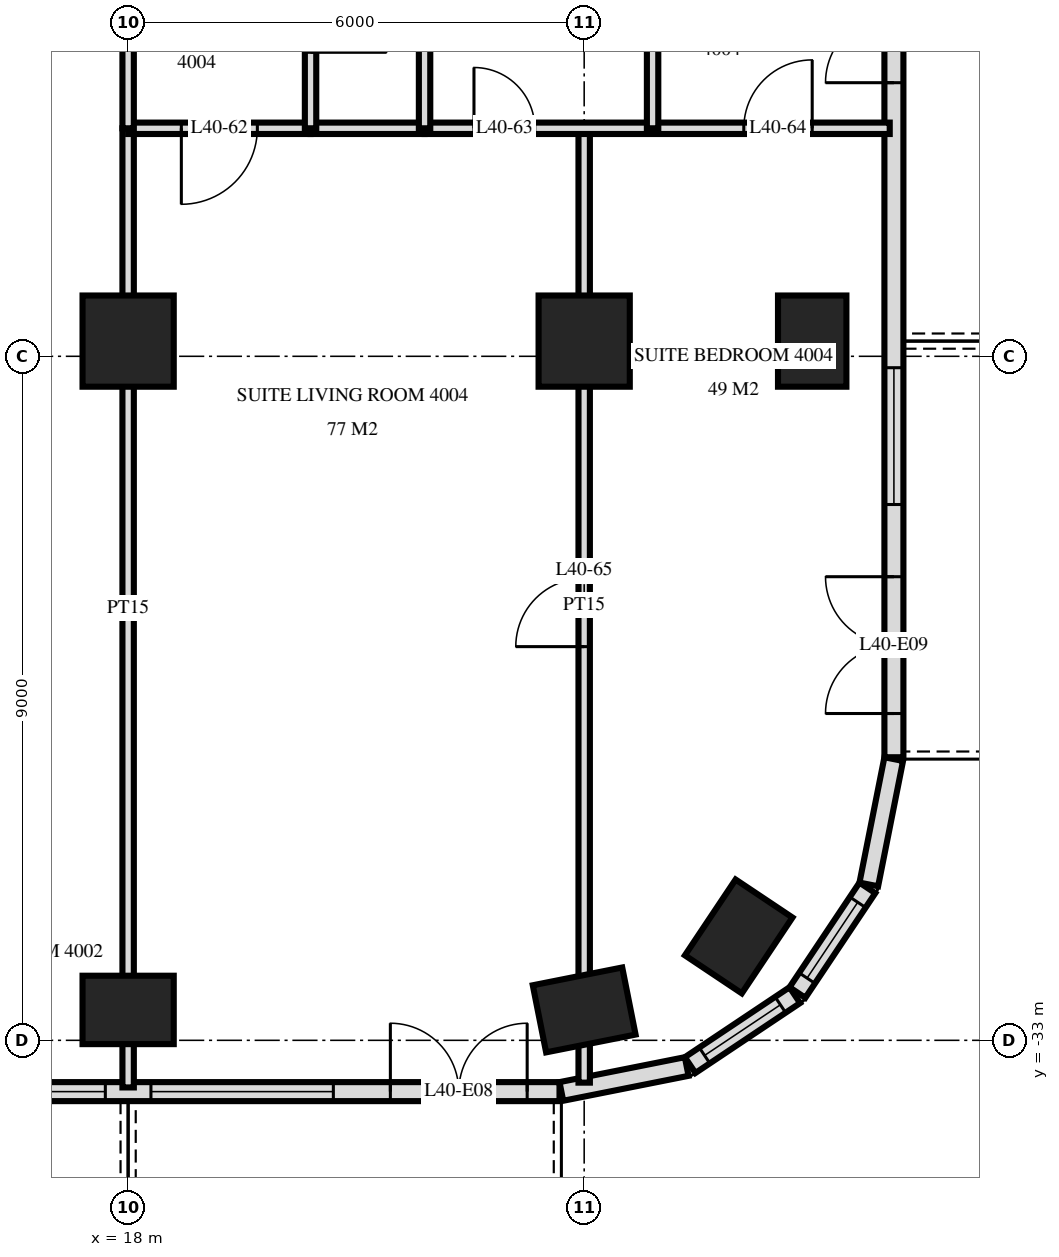
"""IFC4 building model, lengths in metres.
Left out: names, types, materials, properties, quantities, classifications, styles, units other than length and angle.
Written with IfcOpenShell. Run it as: python <this file> out.ifc"""

import sys

from ifc_helpers import new_model, si_unit, direction, frame, frame_2d, origin, origin_2d, place, context, subcontext, project, spatial, rectangle, extrude, element, fill, save


model = new_model("IFC4")
c1 = context("Model", 3, precision=1e-05, world=origin(), true_north=direction((0.0, 1.0)))
c2 = subcontext(c1, "Body", "Model", "MODEL_VIEW")
j1 = project(units=[si_unit("LENGTHUNIT", "METRE"), si_unit("PLANEANGLEUNIT", "RADIAN")], contexts=[c1])
p1 = place(None, origin())
s1 = spatial("IfcSite", under=j1, at=p1, CompositionType="ELEMENT")
p2 = place(p1, origin())
s2 = spatial("IfcBuilding", under=s1, at=p2, CompositionType="ELEMENT")
p3 = place(p2, frame((0.0, 0.0, 156.0)))
s3 = spatial("IfcBuildingStorey", under=s2, at=p3, CompositionType="ELEMENT", Elevation=156.0)
p4 = place(p3, frame((18.0, -32.6, 0.0), z_axis=(0.0, 0.0, 1.0), x_axis=(1.0, 0.0, 0.0)))
e1 = element("IfcColumn", 1, at=p4, inside=s3, PredefinedType="COLUMN", context=c2, shape_type="SweptSolid", body=[
    extrude(rectangle(XDim=1.2, YDim=0.9, at=origin_2d()), origin(), (0.0, 0.0, 1.0), 3.6),
])
p5 = place(p3, frame((18.0, -23.8, 0.0), z_axis=(0.0, 0.0, 1.0), x_axis=(1.0, 0.0, 0.0)))
e2 = element("IfcColumn", 2, at=p5, inside=s3, PredefinedType="COLUMN", context=c2, shape_type="SweptSolid", body=[
    extrude(rectangle(XDim=1.2, YDim=1.2, at=origin_2d()), origin(), (0.0, 0.0, 1.0), 3.6),
])
p6 = place(p3, frame((24.0, -32.6, 0.0), z_axis=(0.0, 0.0, 1.0), x_axis=(0.980792089743, 0.195056086032, 0.0)))
e3 = element("IfcColumn", 3, at=p6, inside=s3, PredefinedType="COLUMN", context=c2, shape_type="SweptSolid", body=[
    extrude(rectangle(XDim=1.2, YDim=0.9, at=origin_2d()), origin(), (0.0, 0.0, 1.0), 3.6),
])
p7 = place(p3, frame((24.0, -23.8, 0.0), z_axis=(0.0, 0.0, 1.0), x_axis=(1.0, 0.0, 0.0)))
e4 = element("IfcColumn", 4, at=p7, inside=s3, PredefinedType="COLUMN", context=c2, shape_type="SweptSolid", body=[
    extrude(rectangle(XDim=1.2, YDim=1.2, at=origin_2d()), origin(), (0.0, 0.0, 1.0), 3.6),
])
for number, where, z_axis, x_axis in (
    (5, (26.033, -31.633, 0.0), (0.0, 0.0, 1.0), (0.556, 0.831, 0.0)),
    (6, (27.0, -23.8, 0.0), (0.0, 0.0, 1.0), (0.0, 1.0, 0.0)),
):
    element("IfcColumn", number, at=place(p3, frame(where, z_axis=z_axis, x_axis=x_axis)), inside=s3, PredefinedType="COLUMN", context=c2, shape_type="SweptSolid", body=[
        extrude(rectangle(XDim=1.2, YDim=0.9, at=origin_2d()), origin(), (0.0, 0.0, 1.0), 3.6),
    ])
p8 = place(p3, frame((-23.675, -33.675, 0.0), z_axis=(0.0, 0.0, 1.0), x_axis=(1.0, 0.0, 0.0)))
e7 = element("IfcWall", 7, at=p8, inside=s3, PredefinedType="SOLIDWALL", context=c2, shape_type="SweptSolid", body=[
    extrude(rectangle(XDim=47.351, YDim=0.25, at=frame_2d((23.675, 0.0))), origin(), (0.0, 0.0, 1.0), 3.32),
])
p9 = place(p8, frame((0.275, 0.0, 0.3)))
e8 = element("IfcOpeningElement", 8, at=p9, cuts=e7, PredefinedType="OPENING", context=c2, shape_type="SweptSolid", body=[
    extrude(rectangle(XDim=2.4, YDim=2.1, at=frame_2d((1.2, 1.05))), frame((0.0, 0.135, 0.0), z_axis=(0.0, -1.0, 0.0), x_axis=(1.0, 0.0, 0.0)), (0.0, 0.0, 1.0), 0.27),
])
p10 = place(p8, frame((3.425, 0.0, 0.0)))
e9 = element("IfcOpeningElement", 9, at=p10, cuts=e7, PredefinedType="OPENING", context=c2, shape_type="SweptSolid", body=[
    extrude(rectangle(XDim=1.8, YDim=2.4, at=frame_2d((0.9, 1.2))), frame((0.0, 0.135, 0.0), z_axis=(0.0, -1.0, 0.0), x_axis=(1.0, 0.0, 0.0)), (0.0, 0.0, 1.0), 0.27),
])
p11 = place(p8, frame((7.775, 0.0, 0.0)))
e10 = element("IfcOpeningElement", 10, at=p11, cuts=e7, PredefinedType="OPENING", context=c2, shape_type="SweptSolid", body=[
    extrude(rectangle(XDim=1.8, YDim=2.4, at=frame_2d((0.9, 1.2))), frame((0.0, 0.135, 0.0), z_axis=(0.0, -1.0, 0.0), x_axis=(1.0, 0.0, 0.0)), (0.0, 0.0, 1.0), 0.27),
])
p12 = place(p8, frame((12.275, 0.0, 0.0)))
e11 = element("IfcOpeningElement", 11, at=p12, cuts=e7, PredefinedType="OPENING", context=c2, shape_type="SweptSolid", body=[
    extrude(rectangle(XDim=1.8, YDim=2.4, at=frame_2d((0.9, 1.2))), frame((0.0, 0.135, 0.0), z_axis=(0.0, -1.0, 0.0), x_axis=(1.0, 0.0, 0.0)), (0.0, 0.0, 1.0), 0.27),
])
p13 = place(p8, frame((14.975, 0.0, 0.3)))
e12 = element("IfcOpeningElement", 12, at=p13, cuts=e7, PredefinedType="OPENING", context=c2, shape_type="SweptSolid", body=[
    extrude(rectangle(XDim=2.4, YDim=2.1, at=frame_2d((1.2, 1.05))), frame((0.0, 0.135, 0.0), z_axis=(0.0, -1.0, 0.0), x_axis=(1.0, 0.0, 0.0)), (0.0, 0.0, 1.0), 0.27),
])
p14 = place(p8, frame((17.975, 0.0, 0.3)))
e13 = element("IfcOpeningElement", 13, at=p14, cuts=e7, PredefinedType="OPENING", context=c2, shape_type="SweptSolid", body=[
    extrude(rectangle(XDim=2.4, YDim=2.1, at=frame_2d((1.2, 1.05))), frame((0.0, 0.135, 0.0), z_axis=(0.0, -1.0, 0.0), x_axis=(1.0, 0.0, 0.0)), (0.0, 0.0, 1.0), 0.27),
])
p15 = place(p8, frame((21.275, 0.0, 0.0)))
e14 = element("IfcOpeningElement", 14, at=p15, cuts=e7, PredefinedType="OPENING", context=c2, shape_type="SweptSolid", body=[
    extrude(rectangle(XDim=1.8, YDim=2.4, at=frame_2d((0.9, 1.2))), frame((0.0, 0.135, 0.0), z_axis=(0.0, -1.0, 0.0), x_axis=(1.0, 0.0, 0.0)), (0.0, 0.0, 1.0), 0.27),
])
p16 = place(p8, frame((24.275, 0.0, 0.0)))
e15 = element("IfcOpeningElement", 15, at=p16, cuts=e7, PredefinedType="OPENING", context=c2, shape_type="SweptSolid", body=[
    extrude(rectangle(XDim=1.8, YDim=2.4, at=frame_2d((0.9, 1.2))), frame((0.0, 0.135, 0.0), z_axis=(0.0, -1.0, 0.0), x_axis=(1.0, 0.0, 0.0)), (0.0, 0.0, 1.0), 0.27),
])
p17 = place(p8, frame((26.975, 0.0, 0.3)))
e16 = element("IfcOpeningElement", 16, at=p17, cuts=e7, PredefinedType="OPENING", context=c2, shape_type="SweptSolid", body=[
    extrude(rectangle(XDim=2.4, YDim=2.1, at=frame_2d((1.2, 1.05))), frame((0.0, 0.135, 0.0), z_axis=(0.0, -1.0, 0.0), x_axis=(1.0, 0.0, 0.0)), (0.0, 0.0, 1.0), 0.27),
])
p18 = place(p8, frame((30.275, 0.0, 0.0)))
e17 = element("IfcOpeningElement", 17, at=p18, cuts=e7, PredefinedType="OPENING", context=c2, shape_type="SweptSolid", body=[
    extrude(rectangle(XDim=1.8, YDim=2.4, at=frame_2d((0.9, 1.2))), frame((0.0, 0.135, 0.0), z_axis=(0.0, -1.0, 0.0), x_axis=(1.0, 0.0, 0.0)), (0.0, 0.0, 1.0), 0.27),
])
p19 = place(p8, frame((32.975, 0.0, 0.3)))
e18 = element("IfcOpeningElement", 18, at=p19, cuts=e7, PredefinedType="OPENING", context=c2, shape_type="SweptSolid", body=[
    extrude(rectangle(XDim=2.4, YDim=2.1, at=frame_2d((1.2, 1.05))), frame((0.0, 0.135, 0.0), z_axis=(0.0, -1.0, 0.0), x_axis=(1.0, 0.0, 0.0)), (0.0, 0.0, 1.0), 0.27),
])
p20 = place(p8, frame((36.275, 0.0, 0.0)))
e19 = element("IfcOpeningElement", 19, at=p20, cuts=e7, PredefinedType="OPENING", context=c2, shape_type="SweptSolid", body=[
    extrude(rectangle(XDim=1.8, YDim=2.4, at=frame_2d((0.9, 1.2))), frame((0.0, 0.135, 0.0), z_axis=(0.0, -1.0, 0.0), x_axis=(1.0, 0.0, 0.0)), (0.0, 0.0, 1.0), 0.27),
])
p21 = place(p8, frame((38.975, 0.0, 0.3)))
e20 = element("IfcOpeningElement", 20, at=p21, cuts=e7, PredefinedType="OPENING", context=c2, shape_type="SweptSolid", body=[
    extrude(rectangle(XDim=2.4, YDim=2.1, at=frame_2d((1.2, 1.05))), frame((0.0, 0.135, 0.0), z_axis=(0.0, -1.0, 0.0), x_axis=(1.0, 0.0, 0.0)), (0.0, 0.0, 1.0), 0.27),
])
p22 = place(p8, frame((41.975, 0.0, 0.3)))
e21 = element("IfcOpeningElement", 21, at=p22, cuts=e7, PredefinedType="OPENING", context=c2, shape_type="SweptSolid", body=[
    extrude(rectangle(XDim=2.4, YDim=2.1, at=frame_2d((1.2, 1.05))), frame((0.0, 0.135, 0.0), z_axis=(0.0, -1.0, 0.0), x_axis=(1.0, 0.0, 0.0)), (0.0, 0.0, 1.0), 0.27),
])
p23 = place(p8, frame((45.125, 0.0, 0.0)))
e22 = element("IfcOpeningElement", 22, at=p23, cuts=e7, PredefinedType="OPENING", context=c2, shape_type="SweptSolid", body=[
    extrude(rectangle(XDim=1.8, YDim=2.4, at=frame_2d((0.9, 1.2))), frame((0.0, 0.135, 0.0), z_axis=(0.0, -1.0, 0.0), x_axis=(1.0, 0.0, 0.0)), (0.0, 0.0, 1.0), 0.27),
])
p24 = place(p3, frame((23.7, -33.673, 0.0), z_axis=(0.0, 0.0, 1.0), x_axis=(0.980775640221, 0.19513878023, 0.0)))
e23 = element("IfcWall", 23, at=p24, inside=s3, PredefinedType="SOLIDWALL", context=c2, shape_type="SweptSolid", body=[
    extrude(rectangle(XDim=1.681, YDim=0.25, at=frame_2d((0.841, 0.0))), origin(), (0.0, 0.0, 1.0), 3.32),
])
p25 = place(p3, frame((25.394, -33.326, 0.0), z_axis=(0.0, 0.0, 1.0), x_axis=(0.831482937015, 0.55555029066, 0.0)))
e24 = element("IfcWall", 24, at=p25, inside=s3, PredefinedType="SOLIDWALL", context=c2, shape_type="SweptSolid", body=[
    extrude(rectangle(XDim=1.656, YDim=0.25, at=frame_2d((0.828, 0.0))), origin(), (0.0, 0.0, 1.0), 3.32),
])
p26 = place(p25, frame((0.228, 0.0, 0.9)))
e25 = element("IfcOpeningElement", 25, at=p26, cuts=e24, PredefinedType="OPENING", context=c2, shape_type="SweptSolid", body=[
    extrude(rectangle(XDim=1.2, YDim=1.5, at=frame_2d((0.6, 0.75))), frame((0.0, 0.135, 0.0), z_axis=(0.0, -1.0, 0.0), x_axis=(1.0, 0.0, 0.0)), (0.0, 0.0, 1.0), 0.27),
])
p27 = place(p3, frame((26.806, -32.371, 0.0), z_axis=(0.0, 0.0, 1.0), x_axis=(0.55555029066, 0.831482937015, 0.0)))
e26 = element("IfcWall", 26, at=p27, inside=s3, PredefinedType="SOLIDWALL", context=c2, shape_type="SweptSolid", body=[
    extrude(rectangle(XDim=1.656, YDim=0.25, at=frame_2d((0.828, 0.0))), origin(), (0.0, 0.0, 1.0), 3.32),
])
p28 = place(p27, frame((0.228, 0.0, 0.9)))
e27 = element("IfcOpeningElement", 27, at=p28, cuts=e26, PredefinedType="OPENING", context=c2, shape_type="SweptSolid", body=[
    extrude(rectangle(XDim=1.2, YDim=1.5, at=frame_2d((0.6, 0.75))), frame((0.0, 0.135, 0.0), z_axis=(0.0, -1.0, 0.0), x_axis=(1.0, 0.0, 0.0)), (0.0, 0.0, 1.0), 0.27),
])
p29 = place(p3, frame((27.745, -30.949, 0.0), z_axis=(0.0, 0.0, 1.0), x_axis=(0.194999110559, 0.980803419081, 0.0)))
e28 = element("IfcWall", 28, at=p29, inside=s3, PredefinedType="SOLIDWALL", context=c2, shape_type="SweptSolid", body=[
    extrude(rectangle(XDim=1.681, YDim=0.25, at=frame_2d((0.841, 0.0))), origin(), (0.0, 0.0, 1.0), 3.32),
])
p30 = place(p3, frame((28.075, -29.275, 0.0), z_axis=(0.0, 0.0, 1.0), x_axis=(0.0, 1.0, 0.0)))
e29 = element("IfcWall", 29, at=p30, inside=s3, PredefinedType="SOLIDWALL", context=c2, shape_type="SweptSolid", body=[
    extrude(rectangle(XDim=25.951, YDim=0.25, at=frame_2d((12.975, 0.0))), origin(), (0.0, 0.0, 1.0), 3.32),
])
p31 = place(p30, frame((0.575, 0.0, 0.0)))
e30 = element("IfcOpeningElement", 30, at=p31, cuts=e29, PredefinedType="OPENING", context=c2, shape_type="SweptSolid", body=[
    extrude(rectangle(XDim=1.8, YDim=2.4, at=frame_2d((0.9, 1.2))), frame((0.0, 0.135, 0.0), z_axis=(0.0, -1.0, 0.0), x_axis=(1.0, 0.0, 0.0)), (0.0, 0.0, 1.0), 0.27),
])
p32 = place(p30, frame((3.325, 0.0, 0.3)))
e31 = element("IfcOpeningElement", 31, at=p32, cuts=e29, PredefinedType="OPENING", context=c2, shape_type="SweptSolid", body=[
    extrude(rectangle(XDim=1.8, YDim=2.1, at=frame_2d((0.9, 1.05))), frame((0.0, 0.135, 0.0), z_axis=(0.0, -1.0, 0.0), x_axis=(1.0, 0.0, 0.0)), (0.0, 0.0, 1.0), 0.27),
])
p33 = place(p30, frame((8.875, 0.0, 0.0)))
e32 = element("IfcOpeningElement", 32, at=p33, cuts=e29, PredefinedType="OPENING", context=c2, shape_type="SweptSolid", body=[
    extrude(rectangle(XDim=1.8, YDim=2.4, at=frame_2d((0.9, 1.2))), frame((0.0, 0.135, 0.0), z_axis=(0.0, -1.0, 0.0), x_axis=(1.0, 0.0, 0.0)), (0.0, 0.0, 1.0), 0.27),
])
p34 = place(p30, frame((12.175, 0.0, 0.3)))
e33 = element("IfcOpeningElement", 33, at=p34, cuts=e29, PredefinedType="OPENING", context=c2, shape_type="SweptSolid", body=[
    extrude(rectangle(XDim=1.2, YDim=2.1, at=frame_2d((0.6, 1.05))), frame((0.0, 0.135, 0.0), z_axis=(0.0, -1.0, 0.0), x_axis=(1.0, 0.0, 0.0)), (0.0, 0.0, 1.0), 0.27),
])
p35 = place(p30, frame((17.5, 0.0, 0.0)))
e34 = element("IfcOpeningElement", 34, at=p35, cuts=e29, PredefinedType="OPENING", context=c2, shape_type="SweptSolid", body=[
    extrude(rectangle(XDim=1.8, YDim=2.4, at=frame_2d((0.9, 1.2))), frame((0.0, 0.135, 0.0), z_axis=(0.0, -1.0, 0.0), x_axis=(1.0, 0.0, 0.0)), (0.0, 0.0, 1.0), 0.27),
])
p36 = place(p3, frame((24.9, -21.0, 0.0), z_axis=(0.0, 0.0, 1.0), x_axis=(0.0, 1.0, 0.0)))
e35 = element("IfcWall", 35, at=p36, inside=s3, PredefinedType="PARTITIONING", context=c2, shape_type="SweptSolid", body=[
    extrude(rectangle(XDim=3.0, YDim=0.15, at=frame_2d((1.5, 0.0))), origin(), (0.0, 0.0, 1.0), 3.32),
])
p37 = place(p3, frame((24.0, -33.557, 0.0), z_axis=(0.0, 0.0, 1.0), x_axis=(0.0, 1.0, 0.0)))
e36 = element("IfcWall", 36, at=p37, inside=s3, PredefinedType="PARTITIONING", context=c2, shape_type="SweptSolid", body=[
    extrude(rectangle(XDim=12.557, YDim=0.15, at=frame_2d((6.278, 0.0))), origin(), (0.0, 0.0, 1.0), 3.32),
])
p38 = place(p37, frame((5.737, 0.0, 0.0)))
e37 = element("IfcOpeningElement", 37, at=p38, cuts=e36, PredefinedType="OPENING", context=c2, shape_type="SweptSolid", body=[
    extrude(rectangle(XDim=0.9, YDim=2.1, at=frame_2d((0.45, 1.05))), frame((0.0, 0.085, 0.0), z_axis=(0.0, -1.0, 0.0), x_axis=(1.0, 0.0, 0.0)), (0.0, 0.0, 1.0), 0.17),
])
p39 = place(p3, frame((21.9, -21.0, 0.0), z_axis=(0.0, 0.0, 1.0), x_axis=(0.0, 1.0, 0.0)))
e38 = element("IfcWall", 38, at=p39, inside=s3, PredefinedType="PLUMBINGWALL", context=c2, shape_type="SweptSolid", body=[
    extrude(rectangle(XDim=3.0, YDim=0.15, at=frame_2d((1.5, 0.0))), origin(), (0.0, 0.0, 1.0), 3.32),
])
p40 = place(p3, frame((20.4, -21.0, 0.0), z_axis=(0.0, 0.0, 1.0), x_axis=(0.0, 1.0, 0.0)))
e39 = element("IfcWall", 39, at=p40, inside=s3, PredefinedType="PARTITIONING", context=c2, shape_type="SweptSolid", body=[
    extrude(rectangle(XDim=3.0, YDim=0.15, at=frame_2d((1.5, 0.0))), origin(), (0.0, 0.0, 1.0), 3.32),
])
p41 = place(p40, frame((1.0, 0.0, 0.0)))
e40 = element("IfcOpeningElement", 40, at=p41, cuts=e39, PredefinedType="OPENING", context=c2, shape_type="SweptSolid", body=[
    extrude(rectangle(XDim=1.0, YDim=2.1, at=frame_2d((0.5, 1.05))), frame((0.0, 0.085, 0.0), z_axis=(0.0, -1.0, 0.0), x_axis=(1.0, 0.0, 0.0)), (0.0, 0.0, 1.0), 0.17),
])
p42 = place(p3, frame((18.0, -21.0, 0.0), z_axis=(0.0, 0.0, 1.0), x_axis=(0.0, 1.0, 0.0)))
e41 = element("IfcWall", 41, at=p42, inside=s3, PredefinedType="PARTITIONING", context=c2, shape_type="SweptSolid", body=[
    extrude(rectangle(XDim=3.0, YDim=0.15, at=frame_2d((1.5, 0.0))), origin(), (0.0, 0.0, 1.0), 3.32),
])
p43 = place(p3, frame((18.0, -33.62, 0.0), z_axis=(0.0, 0.0, 1.0), x_axis=(0.0, 1.0, 0.0)))
e42 = element("IfcWall", 42, at=p43, inside=s3, PredefinedType="PARTITIONING", context=c2, shape_type="SweptSolid", body=[
    extrude(rectangle(XDim=12.62, YDim=0.15, at=frame_2d((6.31, 0.0))), origin(), (0.0, 0.0, 1.0), 3.32),
])
p44 = place(p3, frame((18.0, -21.0, 0.0), z_axis=(0.0, 0.0, 1.0), x_axis=(1.0, 0.0, 0.0)))
e43 = element("IfcWall", 43, at=p44, inside=s3, PredefinedType="PARTITIONING", context=c2, shape_type="SweptSolid", body=[
    extrude(rectangle(XDim=2.4, YDim=0.15, at=frame_2d((1.2, 0.0))), origin(), (0.0, 0.0, 1.0), 3.32),
])
p45 = place(p44, frame((0.7, 0.0, 0.0)))
e44 = element("IfcOpeningElement", 44, at=p45, cuts=e43, PredefinedType="OPENING", context=c2, shape_type="SweptSolid", body=[
    extrude(rectangle(XDim=1.0, YDim=2.1, at=frame_2d((0.5, 1.05))), frame((0.0, 0.085, 0.0), z_axis=(0.0, -1.0, 0.0), x_axis=(1.0, 0.0, 0.0)), (0.0, 0.0, 1.0), 0.17),
])
p46 = place(p3, frame((21.9, -21.0, 0.0), z_axis=(0.0, 0.0, 1.0), x_axis=(1.0, 0.0, 0.0)))
e45 = element("IfcWall", 45, at=p46, inside=s3, PredefinedType="PARTITIONING", context=c2, shape_type="SweptSolid", body=[
    extrude(rectangle(XDim=6.12, YDim=0.15, at=frame_2d((3.06, 0.0))), origin(), (0.0, 0.0, 1.0), 3.32),
])
p47 = place(p46, frame((0.65, 0.0, 0.0)))
e46 = element("IfcOpeningElement", 46, at=p47, cuts=e45, PredefinedType="OPENING", context=c2, shape_type="SweptSolid", body=[
    extrude(rectangle(XDim=0.8, YDim=2.1, at=frame_2d((0.4, 1.05))), frame((0.0, 0.085, 0.0), z_axis=(0.0, -1.0, 0.0), x_axis=(1.0, 0.0, 0.0)), (0.0, 0.0, 1.0), 0.17),
])
p48 = place(p46, frame((4.2, 0.0, 0.0)))
e47 = element("IfcOpeningElement", 47, at=p48, cuts=e45, PredefinedType="OPENING", context=c2, shape_type="SweptSolid", body=[
    extrude(rectangle(XDim=0.9, YDim=2.1, at=frame_2d((0.45, 1.05))), frame((0.0, 0.085, 0.0), z_axis=(0.0, -1.0, 0.0), x_axis=(1.0, 0.0, 0.0)), (0.0, 0.0, 1.0), 0.17),
])
p49 = place(p3, frame((20.4, -21.0, 0.0), z_axis=(0.0, 0.0, 1.0), x_axis=(1.0, 0.0, 0.0)))
e48 = element("IfcWall", 48, at=p49, inside=s3, PredefinedType="PLUMBINGWALL", context=c2, shape_type="SweptSolid", body=[
    extrude(rectangle(XDim=1.5, YDim=0.15, at=frame_2d((0.75, 0.0))), origin(), (0.0, 0.0, 1.0), 3.32),
])
p50 = place(p26, origin())
e49 = element("IfcWindow", 49, at=p50, inside=s3, PartitioningType="SINGLE_PANEL", PredefinedType="WINDOW", context=c2, shape_type="SweptSolid", body=[
    extrude(rectangle(XDim=1.2, YDim=1.5, at=frame_2d((0.6, 0.75))), frame((0.0, 0.03, 0.0), z_axis=(0.0, -1.0, 0.0), x_axis=(1.0, 0.0, 0.0)), (0.0, 0.0, 1.0), 0.06),
])
fill(e25, e49)
p51 = place(p28, origin())
e50 = element("IfcWindow", 50, at=p51, inside=s3, PartitioningType="SINGLE_PANEL", PredefinedType="WINDOW", context=c2, shape_type="SweptSolid", body=[
    extrude(rectangle(XDim=1.2, YDim=1.5, at=frame_2d((0.6, 0.75))), frame((0.0, 0.03, 0.0), z_axis=(0.0, -1.0, 0.0), x_axis=(1.0, 0.0, 0.0)), (0.0, 0.0, 1.0), 0.06),
])
fill(e27, e50)
p52 = place(p21, origin())
e51 = element("IfcWindow", 51, at=p52, inside=s3, PartitioningType="SINGLE_PANEL", PredefinedType="WINDOW", context=c2, shape_type="SweptSolid", body=[
    extrude(rectangle(XDim=2.4, YDim=2.1, at=frame_2d((1.2, 1.05))), frame((0.0, 0.03, 0.0), z_axis=(0.0, -1.0, 0.0), x_axis=(1.0, 0.0, 0.0)), (0.0, 0.0, 1.0), 0.06),
])
fill(e20, e51)
p53 = place(p22, origin())
e52 = element("IfcWindow", 52, at=p53, inside=s3, PartitioningType="SINGLE_PANEL", PredefinedType="WINDOW", context=c2, shape_type="SweptSolid", body=[
    extrude(rectangle(XDim=2.4, YDim=2.1, at=frame_2d((1.2, 1.05))), frame((0.0, 0.03, 0.0), z_axis=(0.0, -1.0, 0.0), x_axis=(1.0, 0.0, 0.0)), (0.0, 0.0, 1.0), 0.06),
])
fill(e21, e52)
p54 = place(p23, origin())
e53 = element("IfcDoor", 53, at=p54, inside=s3, OperationType="DOUBLE_DOOR_SINGLE_SWING", PredefinedType="DOOR", context=c2, shape_type="SweptSolid", body=[
    extrude(rectangle(XDim=1.8, YDim=2.4, at=frame_2d((0.9, 1.2))), frame((0.0, 0.025, 0.0), z_axis=(0.0, -1.0, 0.0), x_axis=(1.0, 0.0, 0.0)), (0.0, 0.0, 1.0), 0.05),
])
fill(e22, e53)
p55 = place(p31, origin())
e54 = element("IfcDoor", 54, at=p55, inside=s3, OperationType="DOUBLE_DOOR_SINGLE_SWING", PredefinedType="DOOR", context=c2, shape_type="SweptSolid", body=[
    extrude(rectangle(XDim=1.8, YDim=2.4, at=frame_2d((0.9, 1.2))), frame((0.0, 0.025, 0.0), z_axis=(0.0, -1.0, 0.0), x_axis=(1.0, 0.0, 0.0)), (0.0, 0.0, 1.0), 0.05),
])
fill(e30, e54)
p56 = place(p32, origin())
e55 = element("IfcWindow", 55, at=p56, inside=s3, PartitioningType="SINGLE_PANEL", PredefinedType="WINDOW", context=c2, shape_type="SweptSolid", body=[
    extrude(rectangle(XDim=1.8, YDim=2.1, at=frame_2d((0.9, 1.05))), frame((0.0, 0.03, 0.0), z_axis=(0.0, -1.0, 0.0), x_axis=(1.0, 0.0, 0.0)), (0.0, 0.0, 1.0), 0.06),
])
fill(e31, e55)
p57 = place(p33, origin())
e56 = element("IfcDoor", 56, at=p57, inside=s3, OperationType="DOUBLE_DOOR_SINGLE_SWING", PredefinedType="DOOR", context=c2, shape_type="SweptSolid", body=[
    extrude(rectangle(XDim=1.8, YDim=2.4, at=frame_2d((0.9, 1.2))), frame((0.0, 0.025, 0.0), z_axis=(0.0, -1.0, 0.0), x_axis=(1.0, 0.0, 0.0)), (0.0, 0.0, 1.0), 0.05),
])
fill(e32, e56)
p58 = place(p45, frame((0.5, 0.0, 0.0), z_axis=(0.0, 0.0, 1.0), x_axis=(-1.0, 0.0, 0.0)))
e57 = element("IfcDoor", 57, at=p58, inside=s3, OperationType="SINGLE_SWING_LEFT", PredefinedType="DOOR", context=c2, shape_type="SweptSolid", body=[
    extrude(rectangle(XDim=1.0, YDim=2.1, at=frame_2d((0.0, 1.05))), frame((0.0, -0.025, 0.0), z_axis=(0.0, 1.0, 0.0), x_axis=(-1.0, 0.0, 0.0)), (0.0, 0.0, 1.0), 0.05),
])
fill(e44, e57)
p59 = place(p47, origin())
e58 = element("IfcDoor", 58, at=p59, inside=s3, OperationType="SINGLE_SWING_RIGHT", PredefinedType="DOOR", context=c2, shape_type="SweptSolid", body=[
    extrude(rectangle(XDim=0.8, YDim=2.1, at=frame_2d((0.4, 1.05))), frame((0.0, 0.025, 0.0), z_axis=(0.0, -1.0, 0.0), x_axis=(1.0, 0.0, 0.0)), (0.0, 0.0, 1.0), 0.05),
])
fill(e46, e58)
p60 = place(p48, origin())
e59 = element("IfcDoor", 59, at=p60, inside=s3, OperationType="SINGLE_SWING_LEFT", PredefinedType="DOOR", context=c2, shape_type="SweptSolid", body=[
    extrude(rectangle(XDim=0.9, YDim=2.1, at=frame_2d((0.45, 1.05))), frame((0.0, 0.025, 0.0), z_axis=(0.0, -1.0, 0.0), x_axis=(1.0, 0.0, 0.0)), (0.0, 0.0, 1.0), 0.05),
])
fill(e47, e59)
p61 = place(p38, origin())
e60 = element("IfcDoor", 60, at=p61, inside=s3, OperationType="SINGLE_SWING_RIGHT", PredefinedType="DOOR", context=c2, shape_type="SweptSolid", body=[
    extrude(rectangle(XDim=0.9, YDim=2.1, at=frame_2d((0.45, 1.05))), frame((0.0, 0.025, 0.0), z_axis=(0.0, -1.0, 0.0), x_axis=(1.0, 0.0, 0.0)), (0.0, 0.0, 1.0), 0.05),
])
fill(e37, e60)
save(model, sys.argv[1])
